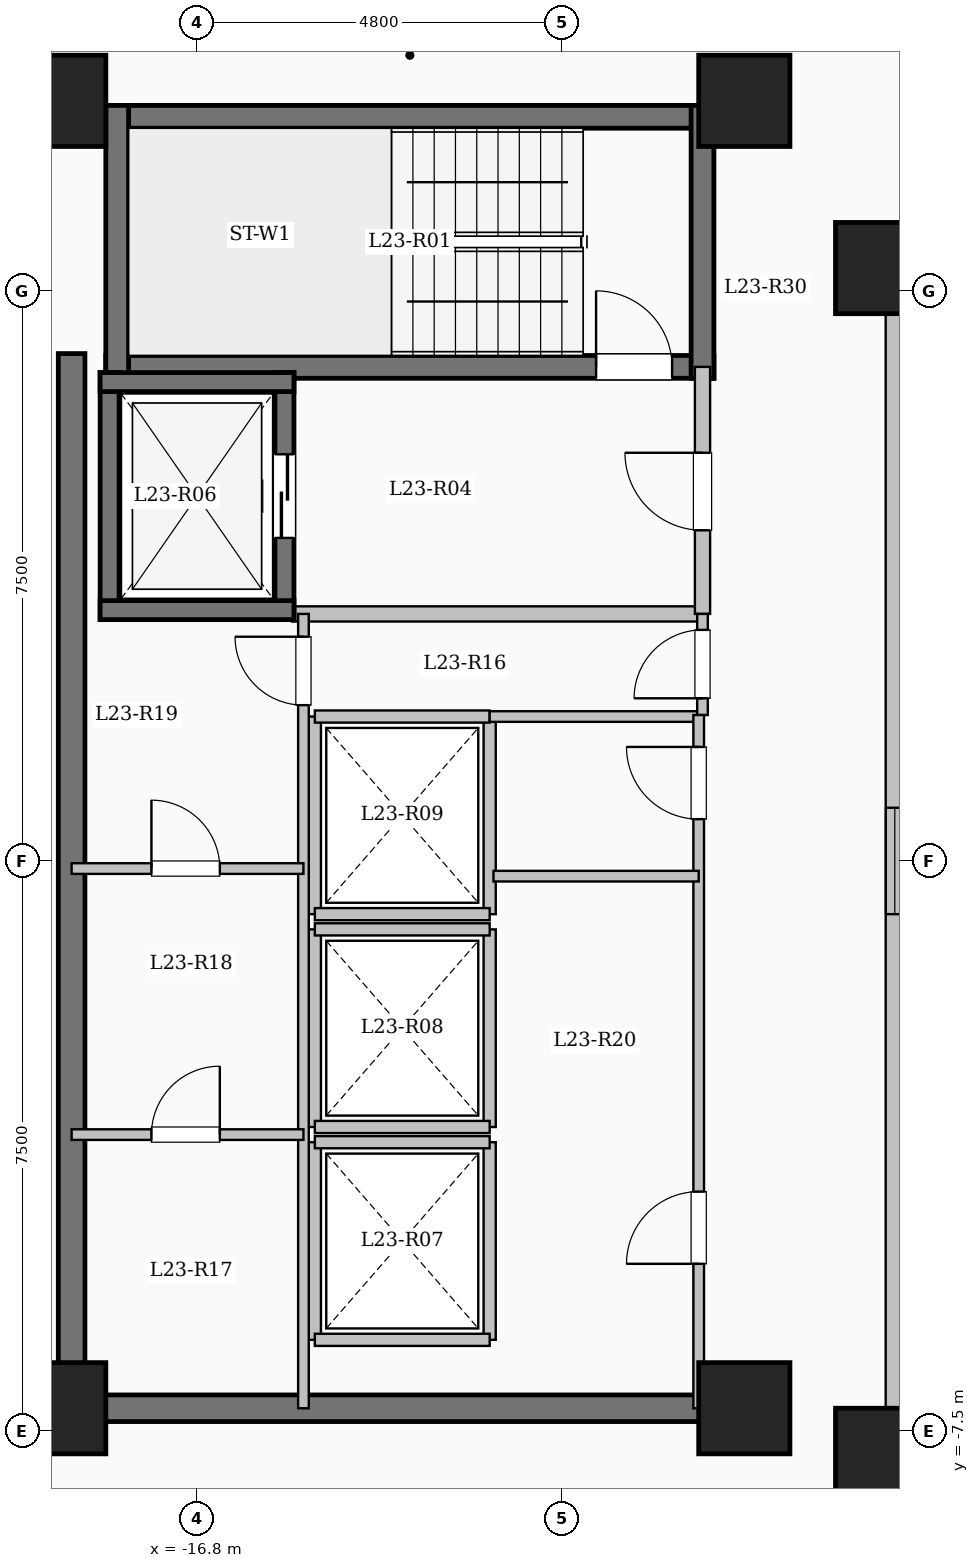
"""IFC4 building model, lengths in metres.
Left out: names, types, materials, properties, quantities, classifications, styles, units other than length and angle.
Written with IfcOpenShell. Run it as: python <this file> out.ifc"""

import sys

from ifc_helpers import new_model, si_unit, direction, frame, frame_2d, origin, origin_2d, place, context, subcontext, project, spatial, rectangle, extrude, element, fill, save


model = new_model("IFC4")
c1 = context("Model", 3, precision=1e-05, world=origin(), true_north=direction((0.0, 1.0)))
c2 = subcontext(c1, "Body", "Model", "MODEL_VIEW")
j1 = project(units=[si_unit("LENGTHUNIT", "METRE"), si_unit("PLANEANGLEUNIT", "RADIAN")], contexts=[c1])
p1 = place(None, origin())
s1 = spatial("IfcSite", under=j1, at=p1, CompositionType="ELEMENT")
p2 = place(p1, origin())
s2 = spatial("IfcBuilding", under=s1, at=p2, CompositionType="ELEMENT")
p3 = place(p2, frame((0.0, 0.0, 88.35)))
s3 = spatial("IfcBuildingStorey", under=s2, at=p3, CompositionType="ELEMENT", Elevation=88.35)
for number, where, z_axis, x_axis in (
    (1, (-7.8, -7.8, 0.0), (0.0, 0.0, 1.0), (1.0, 0.0, 0.0)),
    (2, (-7.8, 7.8, 0.0), (0.0, 0.0, 1.0), (1.0, 0.0, 0.0)),
    (3, (-9.6, -7.2, 0.0), (0.0, 0.0, 1.0), (1.0, 0.0, 0.0)),
    (4, (-9.6, 10.0, 0.0), (0.0, 0.0, 1.0), (1.0, 0.0, 0.0)),
    (5, (-18.6, -7.2, 0.0), (0.0, 0.0, 1.0), (1.0, 0.0, 0.0)),
    (6, (-18.6, 10.0, 0.0), (0.0, 0.0, 1.0), (1.0, 0.0, 0.0)),
):
    element("IfcColumn", number, at=place(p3, frame(where, z_axis=z_axis, x_axis=x_axis)), inside=s3, PredefinedType="COLUMN", context=c2, shape_type="SweptSolid", body=[
        extrude(rectangle(XDim=1.2, YDim=1.2, at=origin_2d()), origin(), (0.0, 0.0, 1.0), 3.35),
    ])
p4 = place(p3, frame((-7.62, -7.62, 0.0), z_axis=(0.0, 0.0, 1.0), x_axis=(1.0, 0.0, 0.0)))
e7 = element("IfcWall", 7, at=p4, inside=s3, PredefinedType="SOLIDWALL", context=c2, shape_type="SweptSolid", body=[
    extrude(rectangle(XDim=15.24, YDim=0.24, at=frame_2d((7.62, 0.0))), origin(), (0.0, 0.0, 1.0), 3.1),
])
p5 = place(p4, frame((6.92, 0.0, 0.95)))
e8 = element("IfcOpeningElement", 8, at=p5, cuts=e7, PredefinedType="OPENING", context=c2, shape_type="SweptSolid", body=[
    extrude(rectangle(XDim=1.4, YDim=1.5, at=frame_2d((0.7, 0.75))), frame((0.0, 0.13, 0.0), z_axis=(0.0, -1.0, 0.0), x_axis=(1.0, 0.0, 0.0)), (0.0, 0.0, 1.0), 0.26),
])
p6 = place(p3, frame((7.62, 7.62, 0.0), z_axis=(0.0, 0.0, 1.0), x_axis=(-1.0, 0.0, 0.0)))
e9 = element("IfcWall", 9, at=p6, inside=s3, PredefinedType="SOLIDWALL", context=c2, shape_type="SweptSolid", body=[
    extrude(rectangle(XDim=15.24, YDim=0.24, at=frame_2d((7.62, 0.0))), origin(), (0.0, 0.0, 1.0), 3.1),
])
p7 = place(p6, frame((6.92, 0.0, 0.95)))
e10 = element("IfcOpeningElement", 10, at=p7, cuts=e9, PredefinedType="OPENING", context=c2, shape_type="SweptSolid", body=[
    extrude(rectangle(XDim=1.4, YDim=1.5, at=frame_2d((0.7, 0.75))), frame((0.0, 0.13, 0.0), z_axis=(0.0, -1.0, 0.0), x_axis=(1.0, 0.0, 0.0)), (0.0, 0.0, 1.0), 0.26),
])
p8 = place(p3, frame((-7.62, 7.62, 0.0), z_axis=(0.0, 0.0, 1.0), x_axis=(0.0, -1.0, 0.0)))
e11 = element("IfcWall", 11, at=p8, inside=s3, PredefinedType="SOLIDWALL", context=c2, shape_type="SweptSolid", body=[
    extrude(rectangle(XDim=15.24, YDim=0.24, at=frame_2d((7.62, 0.0))), origin(), (0.0, 0.0, 1.0), 3.1),
])
p9 = place(p8, frame((6.92, 0.0, 0.95)))
e12 = element("IfcOpeningElement", 12, at=p9, cuts=e11, PredefinedType="OPENING", context=c2, shape_type="SweptSolid", body=[
    extrude(rectangle(XDim=1.4, YDim=1.5, at=frame_2d((0.7, 0.75))), frame((0.0, 0.13, 0.0), z_axis=(0.0, -1.0, 0.0), x_axis=(1.0, 0.0, 0.0)), (0.0, 0.0, 1.0), 0.26),
])
p10 = place(p3, frame((-18.0, 9.79, 0.0), z_axis=(0.0, 0.0, 1.0), x_axis=(1.0, 0.0, 0.0)))
e13 = element("IfcWall", 13, at=p10, inside=s3, PredefinedType="SHEAR", context=c2, shape_type="SweptSolid", body=[
    extrude(rectangle(XDim=8.0, YDim=0.3, at=frame_2d((4.0, 0.0))), origin(), (0.0, 0.0, 1.0), 3.35),
])
p11 = place(p3, frame((-18.0, 6.5, 0.0), z_axis=(0.0, 0.0, 1.0), x_axis=(1.0, 0.0, 0.0)))
e14 = element("IfcWall", 14, at=p11, inside=s3, PredefinedType="SHEAR", context=c2, shape_type="SweptSolid", body=[
    extrude(rectangle(XDim=8.0, YDim=0.3, at=frame_2d((4.0, 0.0))), origin(), (0.0, 0.0, 1.0), 3.35),
])
p12 = place(p11, frame((6.45, 0.0, 0.0)))
e15 = element("IfcOpeningElement", 15, at=p12, cuts=e14, PredefinedType="OPENING", context=c2, shape_type="SweptSolid", body=[
    extrude(rectangle(XDim=1.0, YDim=2.15, at=frame_2d((0.5, 1.075))), frame((0.0, 0.16, 0.0), z_axis=(0.0, -1.0, 0.0), x_axis=(1.0, 0.0, 0.0)), (0.0, 0.0, 1.0), 0.32),
])
for number, where, z_axis, x_axis in (
    (16, (-17.85, 6.35, 0.0), (0.0, 0.0, 1.0), (0.0, 1.0, 0.0)),
    (17, (-10.15, 6.35, 0.0), (0.0, 0.0, 1.0), (0.0, 1.0, 0.0)),
):
    element("IfcWall", number, at=place(p3, frame(where, z_axis=z_axis, x_axis=x_axis)), inside=s3, PredefinedType="SHEAR", context=c2, shape_type="SweptSolid", body=[
        extrude(rectangle(XDim=3.59, YDim=0.3, at=frame_2d((1.795, 0.0))), origin(), (0.0, 0.0, 1.0), 3.35),
    ])
p13 = place(p3, frame((-15.55, 3.25, 0.0), z_axis=(0.0, 0.0, 1.0), x_axis=(1.0, 0.0, 0.0)))
e18 = element("IfcWall", 18, at=p13, inside=s3, PredefinedType="SOLIDWALL", context=c2, shape_type="SweptSolid", body=[
    extrude(rectangle(XDim=5.4, YDim=0.2, at=frame_2d((2.7, 0.0))), origin(), (0.0, 0.0, 1.0), 3.1),
])
p14 = place(p3, frame((-10.15, 3.25, 0.0), z_axis=(0.0, 0.0, 1.0), x_axis=(0.0, 1.0, 0.0)))
e19 = element("IfcWall", 19, at=p14, inside=s3, PredefinedType="SOLIDWALL", context=c2, shape_type="SweptSolid", body=[
    extrude(rectangle(XDim=3.25, YDim=0.2, at=frame_2d((1.625, 0.0))), origin(), (0.0, 0.0, 1.0), 3.1),
])
p15 = place(p14, frame((1.1, 0.0, 0.0)))
e20 = element("IfcOpeningElement", 20, at=p15, cuts=e19, PredefinedType="OPENING", context=c2, shape_type="SweptSolid", body=[
    extrude(rectangle(XDim=1.02, YDim=2.15, at=frame_2d((0.51, 1.075))), frame((0.0, 0.11, 0.0), z_axis=(0.0, -1.0, 0.0), x_axis=(1.0, 0.0, 0.0)), (0.0, 0.0, 1.0), 0.22),
])
p16 = place(p3, frame((-17.95, 3.175, 0.0), z_axis=(0.0, 0.0, 1.0), x_axis=(0.0, 1.0, 0.0)))
e21 = element("IfcWall", 21, at=p16, inside=s3, PredefinedType="SHEAR", context=c2, shape_type="SweptSolid", body=[
    extrude(rectangle(XDim=3.25, YDim=0.25, at=frame_2d((1.625, 0.0))), origin(), (0.0, 0.0, 1.0), 3.35),
])
p17 = place(p3, frame((-15.65, 3.175, 0.0), z_axis=(0.0, 0.0, 1.0), x_axis=(0.0, 1.0, 0.0)))
e22 = element("IfcWall", 22, at=p17, inside=s3, PredefinedType="SHEAR", context=c2, shape_type="SweptSolid", body=[
    extrude(rectangle(XDim=3.25, YDim=0.25, at=frame_2d((1.625, 0.0))), origin(), (0.0, 0.0, 1.0), 3.35),
])
p18 = place(p17, frame((1.075, 0.0, 0.0)))
e23 = element("IfcOpeningElement", 23, at=p18, cuts=e22, PredefinedType="OPENING", context=c2, shape_type="SweptSolid", body=[
    extrude(rectangle(XDim=1.1, YDim=2.15, at=frame_2d((0.55, 1.075))), frame((0.0, 0.135, 0.0), z_axis=(0.0, -1.0, 0.0), x_axis=(1.0, 0.0, 0.0)), (0.0, 0.0, 1.0), 0.27),
])
for number, where, z_axis, x_axis in (
    (24, (-18.075, 3.3, 0.0), (0.0, 0.0, 1.0), (1.0, 0.0, 0.0)),
    (25, (-18.075, 6.3, 0.0), (0.0, 0.0, 1.0), (1.0, 0.0, 0.0)),
):
    element("IfcWall", number, at=place(p3, frame(where, z_axis=z_axis, x_axis=x_axis)), inside=s3, PredefinedType="SHEAR", context=c2, shape_type="SweptSolid", body=[
        extrude(rectangle(XDim=2.55, YDim=0.25, at=frame_2d((1.275, 0.0))), origin(), (0.0, 0.0, 1.0), 3.35),
    ])
for number, where, z_axis, x_axis in (
    (26, (-15.25, -6.3, 0.0), (0.0, 0.0, 1.0), (0.0, 1.0, 0.0)),
    (27, (-12.95, -6.3, 0.0), (0.0, 0.0, 1.0), (0.0, 1.0, 0.0)),
):
    element("IfcWall", number, at=place(p3, frame(where, z_axis=z_axis, x_axis=x_axis)), inside=s3, PredefinedType="SOLIDWALL", context=c2, shape_type="SweptSolid", body=[
        extrude(rectangle(XDim=2.6, YDim=0.16, at=frame_2d((1.3, 0.0))), origin(), (0.0, 0.0, 1.0), 3.1),
    ])
for number, where, z_axis, x_axis in (
    (28, (-15.25, -6.3, 0.0), (0.0, 0.0, 1.0), (1.0, 0.0, 0.0)),
    (29, (-15.25, -3.7, 0.0), (0.0, 0.0, 1.0), (1.0, 0.0, 0.0)),
):
    element("IfcWall", number, at=place(p3, frame(where, z_axis=z_axis, x_axis=x_axis)), inside=s3, PredefinedType="SOLIDWALL", context=c2, shape_type="SweptSolid", body=[
        extrude(rectangle(XDim=2.3, YDim=0.16, at=frame_2d((1.15, 0.0))), origin(), (0.0, 0.0, 1.0), 3.1),
    ])
for number, where, z_axis, x_axis in (
    (30, (-15.25, -3.5, 0.0), (0.0, 0.0, 1.0), (0.0, 1.0, 0.0)),
    (31, (-12.95, -3.5, 0.0), (0.0, 0.0, 1.0), (0.0, 1.0, 0.0)),
):
    element("IfcWall", number, at=place(p3, frame(where, z_axis=z_axis, x_axis=x_axis)), inside=s3, PredefinedType="SOLIDWALL", context=c2, shape_type="SweptSolid", body=[
        extrude(rectangle(XDim=2.6, YDim=0.16, at=frame_2d((1.3, 0.0))), origin(), (0.0, 0.0, 1.0), 3.1),
    ])
for number, where, z_axis, x_axis in (
    (32, (-15.25, -3.5, 0.0), (0.0, 0.0, 1.0), (1.0, 0.0, 0.0)),
    (33, (-15.25, -0.9, 0.0), (0.0, 0.0, 1.0), (1.0, 0.0, 0.0)),
):
    element("IfcWall", number, at=place(p3, frame(where, z_axis=z_axis, x_axis=x_axis)), inside=s3, PredefinedType="SOLIDWALL", context=c2, shape_type="SweptSolid", body=[
        extrude(rectangle(XDim=2.3, YDim=0.16, at=frame_2d((1.15, 0.0))), origin(), (0.0, 0.0, 1.0), 3.1),
    ])
for number, where, z_axis, x_axis in (
    (34, (-15.25, -0.7, 0.0), (0.0, 0.0, 1.0), (0.0, 1.0, 0.0)),
    (35, (-12.95, -0.7, 0.0), (0.0, 0.0, 1.0), (0.0, 1.0, 0.0)),
):
    element("IfcWall", number, at=place(p3, frame(where, z_axis=z_axis, x_axis=x_axis)), inside=s3, PredefinedType="SOLIDWALL", context=c2, shape_type="SweptSolid", body=[
        extrude(rectangle(XDim=2.6, YDim=0.16, at=frame_2d((1.3, 0.0))), origin(), (0.0, 0.0, 1.0), 3.1),
    ])
for number, where, z_axis, x_axis in (
    (36, (-15.25, -0.7, 0.0), (0.0, 0.0, 1.0), (1.0, 0.0, 0.0)),
    (37, (-15.25, 1.9, 0.0), (0.0, 0.0, 1.0), (1.0, 0.0, 0.0)),
):
    element("IfcWall", number, at=place(p3, frame(where, z_axis=z_axis, x_axis=x_axis)), inside=s3, PredefinedType="SOLIDWALL", context=c2, shape_type="SweptSolid", body=[
        extrude(rectangle(XDim=2.3, YDim=0.16, at=frame_2d((1.15, 0.0))), origin(), (0.0, 0.0, 1.0), 3.1),
    ])
p19 = place(p3, frame((-18.45, -7.375, 0.0), z_axis=(0.0, 0.0, 1.0), x_axis=(0.0, 1.0, 0.0)))
e38 = element("IfcWall", 38, at=p19, inside=s3, PredefinedType="SHEAR", context=c2, shape_type="SweptSolid", body=[
    extrude(rectangle(XDim=14.05, YDim=0.35, at=frame_2d((7.025, 0.0))), origin(), (0.0, 0.0, 1.0), 3.35),
])
p20 = place(p3, frame((-18.625, -7.2, 0.0), z_axis=(0.0, 0.0, 1.0), x_axis=(1.0, 0.0, 0.0)))
e39 = element("IfcWall", 39, at=p20, inside=s3, PredefinedType="SHEAR", context=c2, shape_type="SweptSolid", body=[
    extrude(rectangle(XDim=8.55, YDim=0.35, at=frame_2d((4.275, 0.0))), origin(), (0.0, 0.0, 1.0), 3.35),
])
p21 = place(p3, frame((-12.95, 1.9, 0.0), z_axis=(0.0, 0.0, 1.0), x_axis=(1.0, 0.0, 0.0)))
e40 = element("IfcWall", 40, at=p21, inside=s3, PredefinedType="PARTITIONING", context=c2, shape_type="SweptSolid", body=[
    extrude(rectangle(XDim=2.8, YDim=0.14, at=frame_2d((1.4, 0.0))), origin(), (0.0, 0.0, 1.0), 3.1),
])
p22 = place(p3, frame((-10.15, 1.92, 0.0), z_axis=(0.0, 0.0, 1.0), x_axis=(0.0, 1.0, 0.0)))
e41 = element("IfcWall", 41, at=p22, inside=s3, PredefinedType="PARTITIONING", context=c2, shape_type="SweptSolid", body=[
    extrude(rectangle(XDim=1.33, YDim=0.14, at=frame_2d((0.665, 0.0))), origin(), (0.0, 0.0, 1.0), 3.1),
])
p23 = place(p22, frame((0.22, 0.0, 0.0)))
e42 = element("IfcOpeningElement", 42, at=p23, cuts=e41, PredefinedType="OPENING", context=c2, shape_type="SweptSolid", body=[
    extrude(rectangle(XDim=0.9, YDim=2.08, at=frame_2d((0.45, 1.04))), frame((0.0, 0.08, 0.0), z_axis=(0.0, -1.0, 0.0), x_axis=(1.0, 0.0, 0.0)), (0.0, 0.0, 1.0), 0.16),
])
p24 = place(p3, frame((-15.4, -7.2, 0.0), z_axis=(0.0, 0.0, 1.0), x_axis=(0.0, 1.0, 0.0)))
e43 = element("IfcWall", 43, at=p24, inside=s3, PredefinedType="PARTITIONING", context=c2, shape_type="SweptSolid", body=[
    extrude(rectangle(XDim=10.45, YDim=0.14, at=frame_2d((5.225, 0.0))), origin(), (0.0, 0.0, 1.0), 3.1),
])
p25 = place(p24, frame((9.25, 0.0, 0.0)))
e44 = element("IfcOpeningElement", 44, at=p25, cuts=e43, PredefinedType="OPENING", context=c2, shape_type="SweptSolid", body=[
    extrude(rectangle(XDim=0.9, YDim=2.08, at=frame_2d((0.45, 1.04))), frame((0.0, 0.08, 0.0), z_axis=(0.0, -1.0, 0.0), x_axis=(1.0, 0.0, 0.0)), (0.0, 0.0, 1.0), 0.16),
])
p26 = place(p3, frame((-18.45, -3.6, 0.0), z_axis=(0.0, 0.0, 1.0), x_axis=(1.0, 0.0, 0.0)))
e45 = element("IfcWall", 45, at=p26, inside=s3, PredefinedType="PARTITIONING", context=c2, shape_type="SweptSolid", body=[
    extrude(rectangle(XDim=3.05, YDim=0.14, at=frame_2d((1.525, 0.0))), origin(), (0.0, 0.0, 1.0), 3.1),
])
p27 = place(p26, frame((1.05, 0.0, 0.0)))
e46 = element("IfcOpeningElement", 46, at=p27, cuts=e45, PredefinedType="OPENING", context=c2, shape_type="SweptSolid", body=[
    extrude(rectangle(XDim=0.9, YDim=2.08, at=frame_2d((0.45, 1.04))), frame((0.0, 0.08, 0.0), z_axis=(0.0, -1.0, 0.0), x_axis=(1.0, 0.0, 0.0)), (0.0, 0.0, 1.0), 0.16),
])
p28 = place(p3, frame((-18.45, -0.1, 0.0), z_axis=(0.0, 0.0, 1.0), x_axis=(1.0, 0.0, 0.0)))
e47 = element("IfcWall", 47, at=p28, inside=s3, PredefinedType="PARTITIONING", context=c2, shape_type="SweptSolid", body=[
    extrude(rectangle(XDim=3.05, YDim=0.14, at=frame_2d((1.525, 0.0))), origin(), (0.0, 0.0, 1.0), 3.1),
])
p29 = place(p28, frame((1.05, 0.0, 0.0)))
e48 = element("IfcOpeningElement", 48, at=p29, cuts=e47, PredefinedType="OPENING", context=c2, shape_type="SweptSolid", body=[
    extrude(rectangle(XDim=0.9, YDim=2.08, at=frame_2d((0.45, 1.04))), frame((0.0, 0.08, 0.0), z_axis=(0.0, -1.0, 0.0), x_axis=(1.0, 0.0, 0.0)), (0.0, 0.0, 1.0), 0.16),
])
p30 = place(p3, frame((-10.2, -7.2, 0.0), z_axis=(0.0, 0.0, 1.0), x_axis=(0.0, 1.0, 0.0)))
e49 = element("IfcWall", 49, at=p30, inside=s3, PredefinedType="PARTITIONING", context=c2, shape_type="SweptSolid", body=[
    extrude(rectangle(XDim=9.12, YDim=0.14, at=frame_2d((4.56, 0.0))), origin(), (0.0, 0.0, 1.0), 3.1),
])
p31 = place(p30, frame((1.9, 0.0, 0.0)))
e50 = element("IfcOpeningElement", 50, at=p31, cuts=e49, PredefinedType="OPENING", context=c2, shape_type="SweptSolid", body=[
    extrude(rectangle(XDim=0.95, YDim=2.12, at=frame_2d((0.475, 1.06))), frame((0.0, 0.08, 0.0), z_axis=(0.0, -1.0, 0.0), x_axis=(1.0, 0.0, 0.0)), (0.0, 0.0, 1.0), 0.16),
])
p32 = place(p30, frame((7.75, 0.0, 0.0)))
e51 = element("IfcOpeningElement", 51, at=p32, cuts=e49, PredefinedType="OPENING", context=c2, shape_type="SweptSolid", body=[
    extrude(rectangle(XDim=0.95, YDim=2.12, at=frame_2d((0.475, 1.06))), frame((0.0, 0.08, 0.0), z_axis=(0.0, -1.0, 0.0), x_axis=(1.0, 0.0, 0.0)), (0.0, 0.0, 1.0), 0.16),
])
p33 = place(p3, frame((-12.9, -0.2, 0.0), z_axis=(0.0, 0.0, 1.0), x_axis=(1.0, 0.0, 0.0)))
e52 = element("IfcWall", 52, at=p33, inside=s3, PredefinedType="PARTITIONING", context=c2, shape_type="SweptSolid", body=[
    extrude(rectangle(XDim=2.7, YDim=0.14, at=frame_2d((1.35, 0.0))), origin(), (0.0, 0.0, 1.0), 3.1),
])
p34 = place(p3, frame((-26.88, -7.25, 0.0), z_axis=(0.0, 0.0, 1.0), x_axis=(1.0, 0.0, 0.0)))
e53 = element("IfcWall", 53, at=p34, inside=s3, PredefinedType="PARTITIONING", context=c2, shape_type="SweptSolid", body=[
    extrude(rectangle(XDim=8.43, YDim=0.15, at=frame_2d((4.215, 0.0))), origin(), (0.0, 0.0, 1.0), 3.1),
])
p35 = place(p34, frame((5.23, 0.0, 0.0)))
e54 = element("IfcOpeningElement", 54, at=p35, cuts=e53, PredefinedType="OPENING", context=c2, shape_type="SweptSolid", body=[
    extrude(rectangle(XDim=1.08, YDim=2.15, at=frame_2d((0.54, 1.075))), frame((0.0, 0.085, 0.0), z_axis=(0.0, -1.0, 0.0), x_axis=(1.0, 0.0, 0.0)), (0.0, 0.0, 1.0), 0.17),
])
p36 = place(p9, origin())
e55 = element("IfcWindow", 55, at=p36, inside=s3, PartitioningType="SINGLE_PANEL", PredefinedType="WINDOW", context=c2, shape_type="SweptSolid", body=[
    extrude(rectangle(XDim=1.4, YDim=1.5, at=frame_2d((0.7, 0.75))), frame((0.0, 0.03, 0.0), z_axis=(0.0, -1.0, 0.0), x_axis=(1.0, 0.0, 0.0)), (0.0, 0.0, 1.0), 0.06),
])
fill(e12, e55)
p37 = place(p12, origin())
e56 = element("IfcDoor", 56, at=p37, inside=s3, OperationType="SINGLE_SWING_LEFT", PredefinedType="DOOR", context=c2, shape_type="SweptSolid", body=[
    extrude(rectangle(XDim=1.0, YDim=2.15, at=frame_2d((0.5, 1.075))), frame((0.0, 0.025, 0.0), z_axis=(0.0, -1.0, 0.0), x_axis=(1.0, 0.0, 0.0)), (0.0, 0.0, 1.0), 0.05),
])
fill(e15, e56)
p38 = place(p15, origin())
e57 = element("IfcDoor", 57, at=p38, inside=s3, OperationType="SINGLE_SWING_RIGHT", PredefinedType="DOOR", context=c2, shape_type="SweptSolid", body=[
    extrude(rectangle(XDim=1.02, YDim=2.15, at=frame_2d((0.51, 1.075))), frame((0.0, 0.025, 0.0), z_axis=(0.0, -1.0, 0.0), x_axis=(1.0, 0.0, 0.0)), (0.0, 0.0, 1.0), 0.05),
])
fill(e20, e57)
p39 = place(p18, origin())
e58 = element("IfcDoor", 58, at=p39, inside=s3, OperationType="SLIDING_TO_LEFT", PredefinedType="DOOR", context=c2, shape_type="SweptSolid", body=[
    extrude(rectangle(XDim=1.1, YDim=2.15, at=frame_2d((0.55, 1.075))), frame((0.0, 0.025, 0.0), z_axis=(0.0, -1.0, 0.0), x_axis=(1.0, 0.0, 0.0)), (0.0, 0.0, 1.0), 0.05),
])
fill(e23, e58)
p40 = place(p23, origin())
e59 = element("IfcDoor", 59, at=p40, inside=s3, OperationType="SINGLE_SWING_LEFT", PredefinedType="DOOR", context=c2, shape_type="SweptSolid", body=[
    extrude(rectangle(XDim=0.9, YDim=2.08, at=frame_2d((0.45, 1.04))), frame((0.0, 0.025, 0.0), z_axis=(0.0, -1.0, 0.0), x_axis=(1.0, 0.0, 0.0)), (0.0, 0.0, 1.0), 0.05),
])
fill(e42, e59)
p41 = place(p25, origin())
e60 = element("IfcDoor", 60, at=p41, inside=s3, OperationType="SINGLE_SWING_RIGHT", PredefinedType="DOOR", context=c2, shape_type="SweptSolid", body=[
    extrude(rectangle(XDim=0.9, YDim=2.08, at=frame_2d((0.45, 1.04))), frame((0.0, 0.025, 0.0), z_axis=(0.0, -1.0, 0.0), x_axis=(1.0, 0.0, 0.0)), (0.0, 0.0, 1.0), 0.05),
])
fill(e44, e60)
p42 = place(p29, origin())
e61 = element("IfcDoor", 61, at=p42, inside=s3, OperationType="SINGLE_SWING_LEFT", PredefinedType="DOOR", context=c2, shape_type="SweptSolid", body=[
    extrude(rectangle(XDim=0.9, YDim=2.08, at=frame_2d((0.45, 1.04))), frame((0.0, 0.025, 0.0), z_axis=(0.0, -1.0, 0.0), x_axis=(1.0, 0.0, 0.0)), (0.0, 0.0, 1.0), 0.05),
])
fill(e48, e61)
p43 = place(p27, origin())
e62 = element("IfcDoor", 62, at=p43, inside=s3, OperationType="SINGLE_SWING_RIGHT", PredefinedType="DOOR", context=c2, shape_type="SweptSolid", body=[
    extrude(rectangle(XDim=0.9, YDim=2.08, at=frame_2d((0.45, 1.04))), frame((0.0, 0.025, 0.0), z_axis=(0.0, -1.0, 0.0), x_axis=(1.0, 0.0, 0.0)), (0.0, 0.0, 1.0), 0.05),
])
fill(e46, e62)
p44 = place(p31, origin())
e63 = element("IfcDoor", 63, at=p44, inside=s3, OperationType="SINGLE_SWING_LEFT", PredefinedType="DOOR", context=c2, shape_type="SweptSolid", body=[
    extrude(rectangle(XDim=0.95, YDim=2.12, at=frame_2d((0.475, 1.06))), frame((0.0, 0.025, 0.0), z_axis=(0.0, -1.0, 0.0), x_axis=(1.0, 0.0, 0.0)), (0.0, 0.0, 1.0), 0.05),
])
fill(e50, e63)
p45 = place(p32, origin())
e64 = element("IfcDoor", 64, at=p45, inside=s3, OperationType="SINGLE_SWING_RIGHT", PredefinedType="DOOR", context=c2, shape_type="SweptSolid", body=[
    extrude(rectangle(XDim=0.95, YDim=2.12, at=frame_2d((0.475, 1.06))), frame((0.0, 0.025, 0.0), z_axis=(0.0, -1.0, 0.0), x_axis=(1.0, 0.0, 0.0)), (0.0, 0.0, 1.0), 0.05),
])
fill(e51, e64)
save(model, sys.argv[1])
